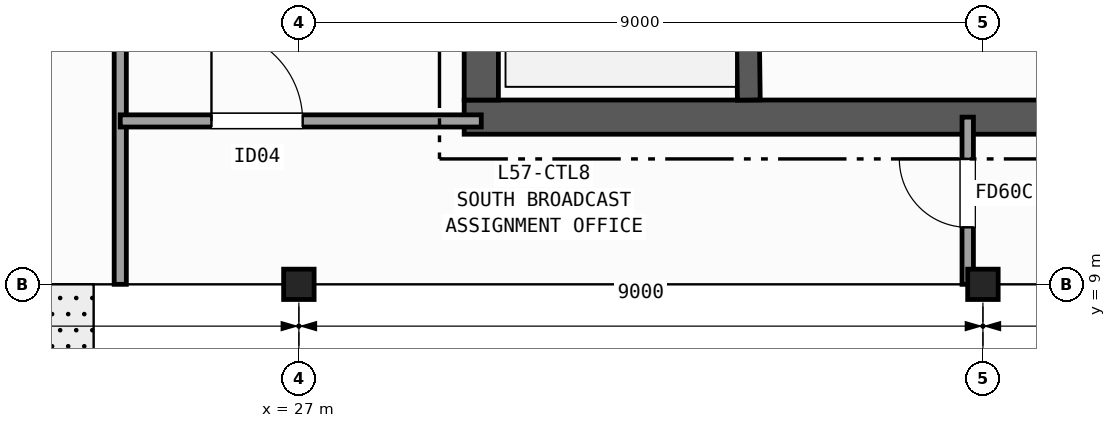
"""IFC4 building model, lengths in metres.
Left out: names, types, materials, properties, quantities, classifications, styles, units other than length and angle.
Written with IfcOpenShell. Run it as: python <this file> out.ifc"""

import sys

from ifc_helpers import new_model, si_unit, direction, frame, frame_2d, origin, origin_2d, place, context, subcontext, project, spatial, rectangle, i_section, extrude, element, fill, save


model = new_model("IFC4")
c1 = context("Model", 3, precision=1e-05, world=origin(), true_north=direction((0.0, 1.0)))
c2 = subcontext(c1, "Body", "Model", "MODEL_VIEW")
j1 = project(units=[si_unit("LENGTHUNIT", "METRE"), si_unit("PLANEANGLEUNIT", "RADIAN")], contexts=[c1])
p1 = place(None, origin())
s1 = spatial("IfcSite", under=j1, at=p1, CompositionType="ELEMENT")
p2 = place(p1, origin())
s2 = spatial("IfcBuilding", under=s1, at=p2, CompositionType="ELEMENT")
p3 = place(p2, frame((0.0, 0.0, 228.4)))
s3 = spatial("IfcBuildingStorey", under=s2, at=p3, CompositionType="ELEMENT", Elevation=228.4)
for number, where, z_axis, x_axis in (
    (1, (27.0, 9.0, 0.0), (0.0, 0.0, 1.0), (1.0, 0.0, 0.0)),
    (2, (36.0, 9.0, 0.0), (0.0, 0.0, 1.0), (1.0, 0.0, 0.0)),
):
    element("IfcColumn", number, at=place(p3, frame(where, z_axis=z_axis, x_axis=x_axis)), inside=s3, PredefinedType="COLUMN", context=c2, shape_type="SweptSolid", body=[
        extrude(i_section(OverallWidth=0.401, OverallDepth=0.399, WebThickness=0.025, FlangeThickness=0.04, FilletRadius=0.015, at=origin_2d()), origin(), (0.0, 0.0, 1.0), 3.7),
    ])
p4 = place(p3, frame((29.175, 11.2, 0.0), z_axis=(0.0, 0.0, 1.0), x_axis=(1.0, 0.0, 0.0)))
e3 = element("IfcWall", 3, at=p4, inside=s3, PredefinedType="SHEAR", context=c2, shape_type="SweptSolid", body=[
    extrude(rectangle(XDim=13.85, YDim=0.45, at=frame_2d((6.925, 0.0))), origin(), (0.0, 0.0, 1.0), 3.42),
])
p5 = place(p3, frame((29.4, 24.375, 0.0), z_axis=(0.0, 0.0, 1.0), x_axis=(0.0, -1.0, 0.0)))
e4 = element("IfcWall", 4, at=p5, inside=s3, PredefinedType="SHEAR", context=c2, shape_type="SweptSolid", body=[
    extrude(rectangle(XDim=12.95, YDim=0.45, at=frame_2d((6.475, 0.0))), origin(), (0.0, 0.0, 1.0), 3.42),
])
p6 = place(p5, frame((1.475, 0.0, 0.0)))
e5 = element("IfcOpeningElement", 5, at=p6, cuts=e4, PredefinedType="OPENING", context=c2, shape_type="SweptSolid", body=[
    extrude(rectangle(XDim=1.35, YDim=2.15, at=frame_2d((0.675, 1.075))), frame((0.0, 0.235, 0.0), z_axis=(0.0, -1.0, 0.0), x_axis=(1.0, 0.0, 0.0)), (0.0, 0.0, 1.0), 0.47),
])
p7 = place(p3, frame((32.92, 11.425, 0.0), z_axis=(0.0, 0.0, 1.0), x_axis=(-0.013135638869, 0.999913723774, 0.0)))
e6 = element("IfcWall", 6, at=p7, inside=s3, PredefinedType="SHEAR", context=c2, shape_type="SweptSolid", body=[
    extrude(rectangle(XDim=9.126, YDim=0.3, at=frame_2d((4.563, 0.0))), origin(), (0.0, 0.0, 1.0), 3.42),
])
p8 = place(p3, frame((24.65, 9.0, 0.0), z_axis=(0.0, 0.0, 1.0), x_axis=(0.0, 1.0, 0.0)))
e7 = element("IfcWall", 7, at=p8, inside=s3, PredefinedType="PARTITIONING", context=c2, shape_type="SweptSolid", body=[
    extrude(rectangle(XDim=19.2, YDim=0.16, at=frame_2d((9.6, 0.0))), origin(), (0.0, 0.0, 1.0), 2.707),
])
p9 = place(p8, frame((12.2, 0.0, 0.0)))
e8 = element("IfcOpeningElement", 8, at=p9, cuts=e7, PredefinedType="OPENING", context=c2, shape_type="SweptSolid", body=[
    extrude(rectangle(XDim=1.05, YDim=2.15, at=frame_2d((0.525, 1.075))), frame((0.0, 0.09, 0.0), z_axis=(0.0, -1.0, 0.0), x_axis=(1.0, 0.0, 0.0)), (0.0, 0.0, 1.0), 0.18),
])
p10 = place(p8, frame((4.2, 0.0, 0.0)))
e9 = element("IfcOpeningElement", 9, at=p10, cuts=e7, PredefinedType="OPENING", context=c2, shape_type="SweptSolid", body=[
    extrude(rectangle(XDim=1.2, YDim=2.15, at=frame_2d((0.6, 1.075))), frame((0.0, 0.09, 0.0), z_axis=(0.0, -1.0, 0.0), x_axis=(1.0, 0.0, 0.0)), (0.0, 0.0, 1.0), 0.18),
])
p11 = place(p3, frame((24.65, 11.15, 0.0), z_axis=(0.0, 0.0, 1.0), x_axis=(1.0, 0.0, 0.0)))
e10 = element("IfcWall", 10, at=p11, inside=s3, PredefinedType="PARTITIONING", context=c2, shape_type="SweptSolid", body=[
    extrude(rectangle(XDim=4.75, YDim=0.16, at=frame_2d((2.375, 0.0))), origin(), (0.0, 0.0, 1.0), 2.792),
])
p12 = place(p11, frame((1.2, 0.0, 0.0)))
e11 = element("IfcOpeningElement", 11, at=p12, cuts=e10, PredefinedType="OPENING", context=c2, shape_type="SweptSolid", body=[
    extrude(rectangle(XDim=1.2, YDim=2.15, at=frame_2d((0.6, 1.075))), frame((0.0, 0.09, 0.0), z_axis=(0.0, -1.0, 0.0), x_axis=(1.0, 0.0, 0.0)), (0.0, 0.0, 1.0), 0.18),
])
p13 = place(p3, frame((35.8, 9.0, 0.0), z_axis=(0.0, 0.0, 1.0), x_axis=(0.0, 1.0, 0.0)))
e12 = element("IfcWall", 12, at=p13, inside=s3, PredefinedType="PARTITIONING", context=c2, shape_type="SweptSolid", body=[
    extrude(rectangle(XDim=2.2, YDim=0.15, at=frame_2d((1.1, 0.0))), origin(), (0.0, 0.0, 1.0), 2.707),
])
p14 = place(p13, frame((0.75, 0.0, 0.0)))
e13 = element("IfcOpeningElement", 13, at=p14, cuts=e12, PredefinedType="OPENING", context=c2, shape_type="SweptSolid", body=[
    extrude(rectangle(XDim=0.9, YDim=2.1, at=frame_2d((0.45, 1.05))), frame((0.0, 0.085, 0.0), z_axis=(0.0, -1.0, 0.0), x_axis=(1.0, 0.0, 0.0)), (0.0, 0.0, 1.0), 0.17),
])
p15 = place(p12, origin())
e14 = element("IfcDoor", 14, at=p15, inside=s3, OperationType="SINGLE_SWING_LEFT", PredefinedType="DOOR", context=c2, shape_type="SweptSolid", body=[
    extrude(rectangle(XDim=1.2, YDim=2.15, at=frame_2d((0.6, 1.075))), frame((0.0, 0.025, 0.0), z_axis=(0.0, -1.0, 0.0), x_axis=(1.0, 0.0, 0.0)), (0.0, 0.0, 1.0), 0.05),
])
fill(e11, e14)
p16 = place(p14, origin())
e15 = element("IfcDoor", 15, at=p16, inside=s3, OperationType="SINGLE_SWING_RIGHT", PredefinedType="DOOR", context=c2, shape_type="SweptSolid", body=[
    extrude(rectangle(XDim=0.9, YDim=2.1, at=frame_2d((0.45, 1.05))), frame((0.0, 0.025, 0.0), z_axis=(0.0, -1.0, 0.0), x_axis=(1.0, 0.0, 0.0)), (0.0, 0.0, 1.0), 0.05),
])
fill(e13, e15)
save(model, sys.argv[1])
